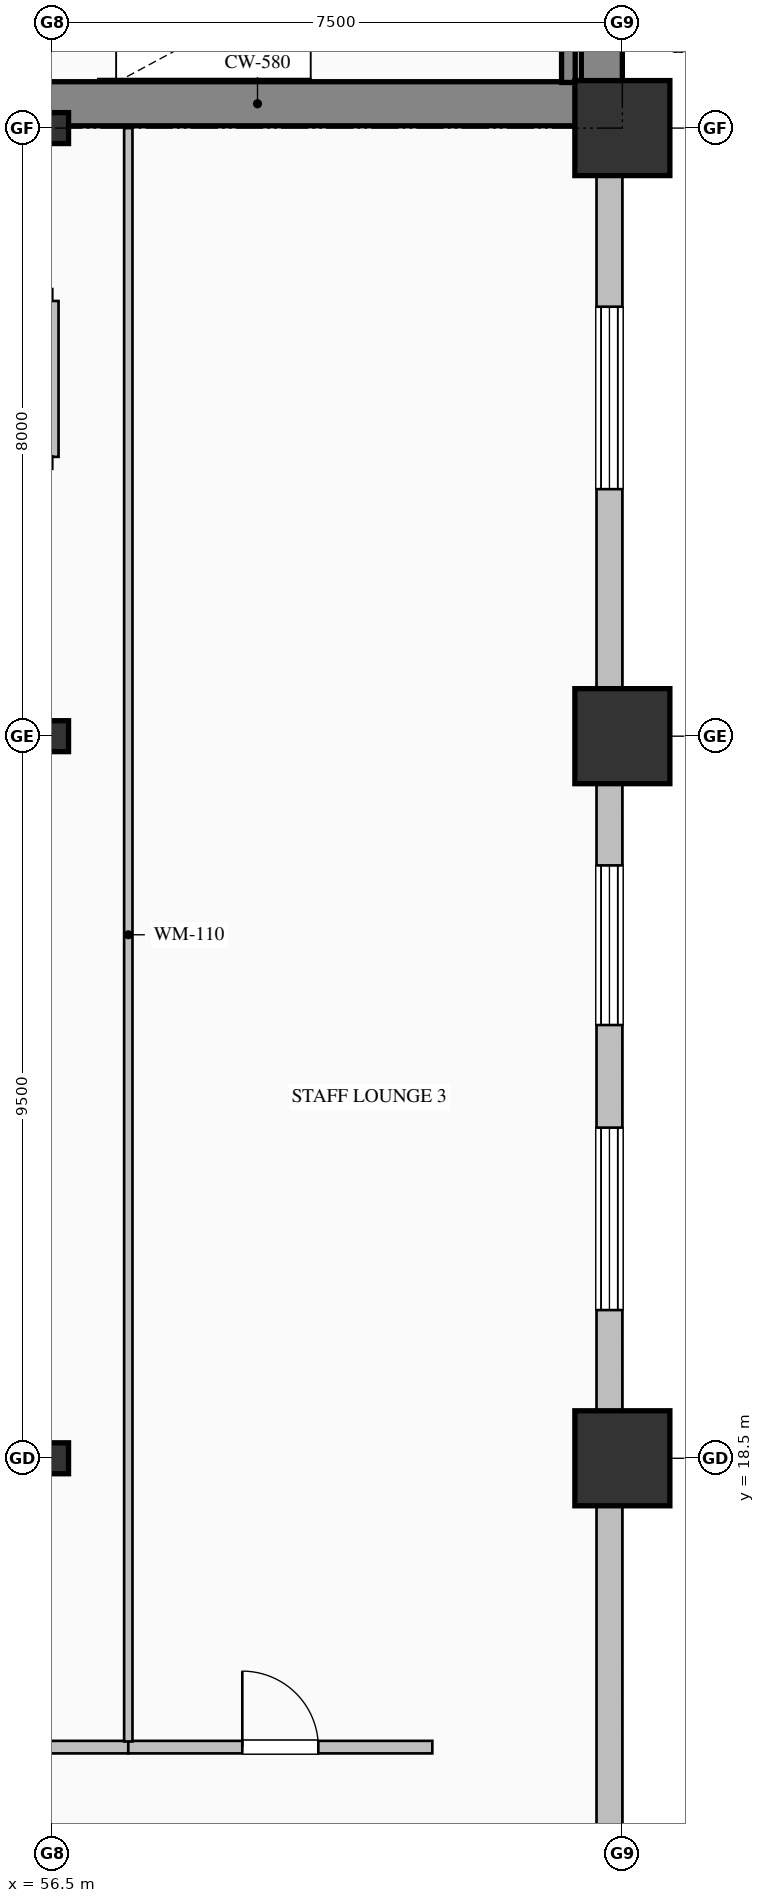
"""IFC4 building model, lengths in metres.
Left out: names, types, materials, properties, quantities, classifications, styles, units other than length and angle.
Written with IfcOpenShell. Run it as: python <this file> out.ifc"""

import sys

from ifc_helpers import new_model, si_unit, direction, frame, frame_2d, origin, origin_2d, place, context, subcontext, project, spatial, rectangle, hollow_rectangle, i_section, extrude, element, fill, save


model = new_model("IFC4")
c1 = context("Model", 3, precision=1e-05, world=origin(), true_north=direction((0.0, 1.0)))
c2 = subcontext(c1, "Body", "Model", "MODEL_VIEW")
j1 = project(units=[si_unit("LENGTHUNIT", "METRE"), si_unit("PLANEANGLEUNIT", "RADIAN")], contexts=[c1])
p1 = place(None, origin())
s1 = spatial("IfcSite", under=j1, at=p1, CompositionType="ELEMENT")
p2 = place(p1, origin())
s2 = spatial("IfcBuilding", under=s1, at=p2, CompositionType="ELEMENT")
p3 = place(p2, frame((0.0, 0.0, 72.2)))
s3 = spatial("IfcBuildingStorey", under=s2, at=p3, CompositionType="ELEMENT", Elevation=72.2)
p4 = place(p3, frame((63.73, 36.32, 0.0), z_axis=(0.0, 0.0, 1.0), x_axis=(0.0, 1.0, 0.0)))
e1 = element("IfcWall", 1, at=p4, inside=s3, PredefinedType="SHEAR", context=c2, shape_type="SweptSolid", body=[
    extrude(rectangle(XDim=15.14, YDim=0.54, at=frame_2d((7.57, 0.0))), origin(), (0.0, 0.0, 1.0), 3.75),
])
p5 = place(p3, frame((54.4, 36.32, 0.0), z_axis=(0.0, 0.0, 1.0), x_axis=(1.0, 0.0, 0.0)))
e2 = element("IfcWall", 2, at=p5, inside=s3, PredefinedType="SHEAR", context=c2, shape_type="SweptSolid", body=[
    extrude(rectangle(XDim=9.6, YDim=0.58, at=frame_2d((4.8, 0.0))), origin(), (0.0, 0.0, 1.0), 4.0),
])
for number, where, z_axis, x_axis in (
    (3, (56.5, 18.5, 0.0), (0.0, 0.0, 1.0), (1.0, 0.0, 0.0)),
    (4, (56.5, 28.0, 0.0), (0.0, 0.0, 1.0), (1.0, 0.0, 0.0)),
    (5, (56.5, 36.0, 0.0), (0.0, 0.0, 1.0), (1.0, 0.0, 0.0)),
):
    element("IfcColumn", number, at=place(p3, frame(where, z_axis=z_axis, x_axis=x_axis)), inside=s3, PredefinedType="COLUMN", context=c2, shape_type="SweptSolid", body=[
        extrude(i_section(OverallWidth=0.407, OverallDepth=0.428, WebThickness=0.02, FlangeThickness=0.035, FilletRadius=0.022, at=origin_2d()), origin(), (0.0, 0.0, 1.0), 4.0),
    ])
for number, where, z_axis, x_axis in (
    (6, (64.0, 18.5, 0.0), (0.0, 0.0, 1.0), (1.0, 0.0, 0.0)),
    (7, (64.0, 28.0, 0.0), (0.0, 0.0, 1.0), (1.0, 0.0, 0.0)),
    (8, (64.0, 36.0, 0.0), (0.0, 0.0, 1.0), (1.0, 0.0, 0.0)),
):
    element("IfcColumn", number, at=place(p3, frame(where, z_axis=z_axis, x_axis=x_axis)), inside=s3, PredefinedType="COLUMN", context=c2, shape_type="SweptSolid", body=[
        extrude(hollow_rectangle(XDim=1.25, YDim=1.25, WallThickness=0.045, at=origin_2d()), origin(), (0.0, 0.0, 1.0), 4.0),
    ])
p6 = place(p3, frame((63.83, 36.05, 0.0), z_axis=(0.0, 0.0, 1.0), x_axis=(0.0, -1.0, 0.0)))
e9 = element("IfcWall", 9, at=p6, inside=s3, PredefinedType="SOLIDWALL", context=c2, shape_type="SweptSolid", body=[
    extrude(rectangle(XDim=28.05, YDim=0.34, at=frame_2d((14.025, 0.0))), origin(), (0.0, 0.0, 1.0), 3.25),
])
p7 = place(p6, frame((2.4, 0.0, 0.8)))
e10 = element("IfcOpeningElement", 10, at=p7, cuts=e9, PredefinedType="OPENING", context=c2, shape_type="SweptSolid", body=[
    extrude(rectangle(XDim=2.4, YDim=2.15, at=frame_2d((1.2, 1.075))), frame((0.0, 0.18, 0.0), z_axis=(0.0, -1.0, 0.0), x_axis=(1.0, 0.0, 0.0)), (0.0, 0.0, 1.0), 0.36),
])
p8 = place(p6, frame((9.75, 0.0, 0.85)))
e11 = element("IfcOpeningElement", 11, at=p8, cuts=e9, PredefinedType="OPENING", context=c2, shape_type="SweptSolid", body=[
    extrude(rectangle(XDim=2.1, YDim=2.05, at=frame_2d((1.05, 1.025))), frame((0.0, 0.18, 0.0), z_axis=(0.0, -1.0, 0.0), x_axis=(1.0, 0.0, 0.0)), (0.0, 0.0, 1.0), 0.36),
])
p9 = place(p6, frame((13.2, 0.0, 0.8)))
e12 = element("IfcOpeningElement", 12, at=p9, cuts=e9, PredefinedType="OPENING", context=c2, shape_type="SweptSolid", body=[
    extrude(rectangle(XDim=2.4, YDim=2.15, at=frame_2d((1.2, 1.075))), frame((0.0, 0.18, 0.0), z_axis=(0.0, -1.0, 0.0), x_axis=(1.0, 0.0, 0.0)), (0.0, 0.0, 1.0), 0.36),
])
p10 = place(p3, frame((63.29, 36.6, 0.0), z_axis=(0.0, 0.0, 1.0), x_axis=(0.0, 1.0, 0.0)))
e13 = element("IfcWall", 13, at=p10, inside=s3, PredefinedType="SOLIDWALL", context=c2, shape_type="SweptSolid", body=[
    extrude(rectangle(XDim=3.15, YDim=0.18, at=frame_2d((1.575, 0.0))), origin(), (0.0, 0.0, 1.0), 4.0),
])
p11 = place(p3, frame((56.5, 33.726, 0.0), z_axis=(0.0, 0.0, 1.0), x_axis=(0.0, -1.0, 0.0)))
e14 = element("IfcWall", 14, at=p11, inside=s3, PredefinedType="PARTITIONING", context=c2, shape_type="SweptSolid", body=[
    extrude(rectangle(XDim=2.051, YDim=0.165, at=frame_2d((1.025, 0.0))), origin(), (0.0, 0.0, 1.0), 3.042),
])
p12 = place(p3, frame((51.5, 14.7, 0.0), z_axis=(0.0, 0.0, 1.0), x_axis=(1.0, 0.0, 0.0)))
e15 = element("IfcWall", 15, at=p12, inside=s3, PredefinedType="PARTITIONING", context=c2, shape_type="SweptSolid", body=[
    extrude(rectangle(XDim=6.0, YDim=0.165, at=frame_2d((3.0, 0.0))), origin(), (0.0, 0.0, 1.0), 3.75),
])
p13 = place(p12, frame((2.5, 0.0, 0.0)))
e16 = element("IfcOpeningElement", 16, at=p13, cuts=e15, PredefinedType="OPENING", context=c2, shape_type="SweptSolid", body=[
    extrude(rectangle(XDim=1.0, YDim=2.15, at=frame_2d((0.5, 1.075))), frame((0.0, 0.093, 0.0), z_axis=(0.0, -1.0, 0.0), x_axis=(1.0, 0.0, 0.0)), (0.0, 0.0, 1.0), 0.185),
])
p14 = place(p3, frame((57.5, 14.7, 0.0), z_axis=(0.0, 0.0, 1.0), x_axis=(1.0, 0.0, 0.0)))
e17 = element("IfcWall", 17, at=p14, inside=s3, PredefinedType="PARTITIONING", context=c2, shape_type="SweptSolid", body=[
    extrude(rectangle(XDim=4.0, YDim=0.165, at=frame_2d((2.0, 0.0))), origin(), (0.0, 0.0, 1.0), 3.75),
])
p15 = place(p14, frame((1.5, 0.0, 0.0)))
e18 = element("IfcOpeningElement", 18, at=p15, cuts=e17, PredefinedType="OPENING", context=c2, shape_type="SweptSolid", body=[
    extrude(rectangle(XDim=1.0, YDim=2.15, at=frame_2d((0.5, 1.075))), frame((0.0, 0.093, 0.0), z_axis=(0.0, -1.0, 0.0), x_axis=(1.0, 0.0, 0.0)), (0.0, 0.0, 1.0), 0.185),
])
p16 = place(p3, frame((57.5, 36.0, 0.0), z_axis=(0.0, 0.0, 1.0), x_axis=(0.0, -1.0, 0.0)))
e19 = element("IfcWall", 19, at=p16, inside=s3, PredefinedType="MOVABLE", context=c2, shape_type="SweptSolid", body=[
    extrude(rectangle(XDim=21.226, YDim=0.11, at=frame_2d((10.613, 0.0))), origin(), (0.0, 0.0, 1.0), 3.75),
])
p17 = place(p7, origin())
e20 = element("IfcWindow", 20, at=p17, inside=s3, PartitioningType="TRIPLE_PANEL_VERTICAL", PredefinedType="WINDOW", context=c2, shape_type="SweptSolid", body=[
    extrude(rectangle(XDim=2.4, YDim=2.15, at=frame_2d((1.2, 1.075))), frame((0.0, 0.15, 0.0), z_axis=(0.0, -1.0, 0.0), x_axis=(1.0, 0.0, 0.0)), (0.0, 0.0, 1.0), 0.06),
])
fill(e10, e20)
p18 = place(p8, origin())
e21 = element("IfcWindow", 21, at=p18, inside=s3, PartitioningType="TRIPLE_PANEL_VERTICAL", PredefinedType="WINDOW", context=c2, shape_type="SweptSolid", body=[
    extrude(rectangle(XDim=2.1, YDim=2.05, at=frame_2d((1.05, 1.025))), frame((0.0, 0.15, 0.0), z_axis=(0.0, -1.0, 0.0), x_axis=(1.0, 0.0, 0.0)), (0.0, 0.0, 1.0), 0.06),
])
fill(e11, e21)
p19 = place(p9, origin())
e22 = element("IfcWindow", 22, at=p19, inside=s3, PartitioningType="TRIPLE_PANEL_VERTICAL", PredefinedType="WINDOW", context=c2, shape_type="SweptSolid", body=[
    extrude(rectangle(XDim=2.4, YDim=2.15, at=frame_2d((1.2, 1.075))), frame((0.0, 0.15, 0.0), z_axis=(0.0, -1.0, 0.0), x_axis=(1.0, 0.0, 0.0)), (0.0, 0.0, 1.0), 0.06),
])
fill(e12, e22)
p20 = place(p15, origin())
e23 = element("IfcDoor", 23, at=p20, inside=s3, OperationType="SINGLE_SWING_LEFT", PredefinedType="DOOR", context=c2, shape_type="SweptSolid", body=[
    extrude(rectangle(XDim=1.0, YDim=2.15, at=frame_2d((0.5, 1.075))), frame((0.0, 0.025, 0.0), z_axis=(0.0, -1.0, 0.0), x_axis=(1.0, 0.0, 0.0)), (0.0, 0.0, 1.0), 0.05),
])
fill(e18, e23)
save(model, sys.argv[1])
